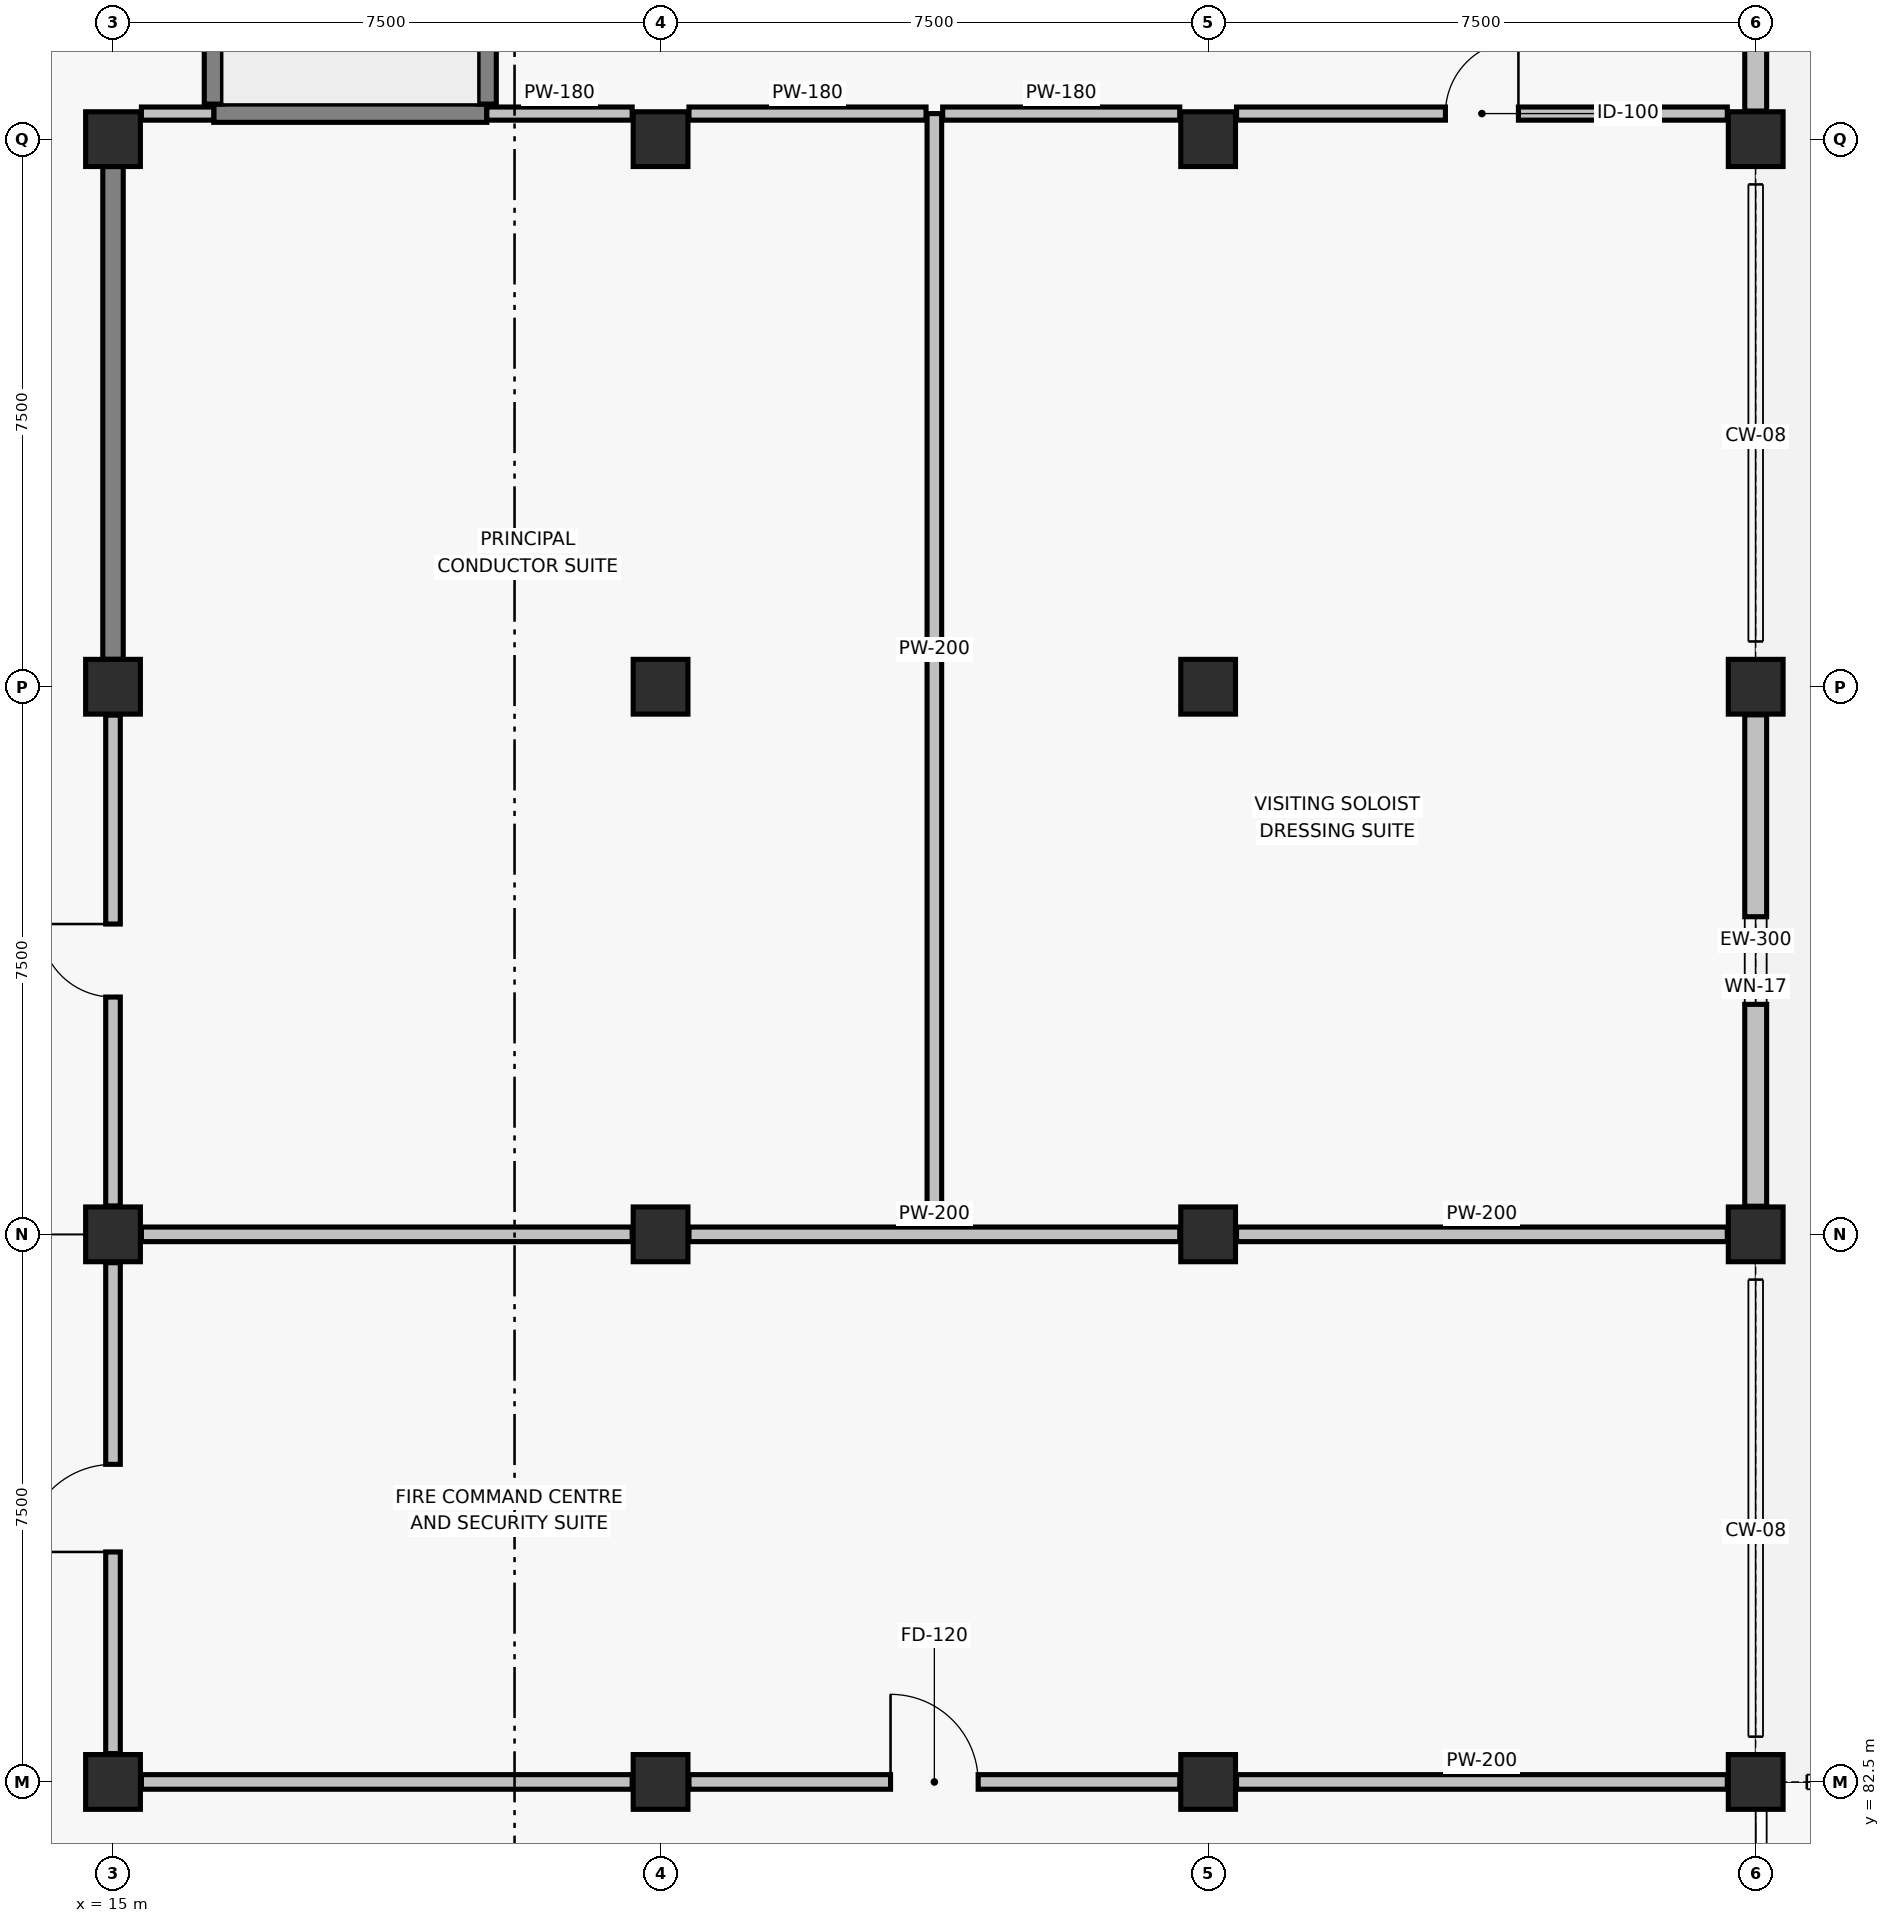
"""IFC4 building model, lengths in metres.
Left out: names, types, materials, properties, quantities, classifications, styles, units other than length and angle.
Written with IfcOpenShell. Run it as: python <this file> out.ifc"""

import sys

from ifc_helpers import new_model, si_unit, direction, frame, frame_2d, origin, origin_2d, place, context, subcontext, project, spatial, rectangle, extrude, element, fill, save


model = new_model("IFC4")
c1 = context("Model", 3, precision=1e-05, world=origin(), true_north=direction((0.0, 1.0)))
c2 = subcontext(c1, "Body", "Model", "MODEL_VIEW")
j1 = project(units=[si_unit("LENGTHUNIT", "METRE"), si_unit("PLANEANGLEUNIT", "RADIAN")], contexts=[c1])
p1 = place(None, origin())
s1 = spatial("IfcSite", under=j1, at=p1, CompositionType="ELEMENT")
p2 = place(p1, origin())
s2 = spatial("IfcBuilding", under=s1, at=p2, CompositionType="ELEMENT")
p3 = place(p2, origin())
s3 = spatial("IfcBuildingStorey", under=s2, at=p3, CompositionType="ELEMENT", Elevation=0.0)
for number, where, z_axis, x_axis in (
    (1, (15.0, 82.5, 0.0), (0.0, 0.0, 1.0), (1.0, 0.0, 0.0)),
    (2, (15.0, 90.0, 0.0), (0.0, 0.0, 1.0), (1.0, 0.0, 0.0)),
    (3, (15.0, 97.5, 0.0), (0.0, 0.0, 1.0), (1.0, 0.0, 0.0)),
    (4, (15.0, 105.0, 0.0), (0.0, 0.0, 1.0), (1.0, 0.0, 0.0)),
    (5, (22.5, 82.5, 0.0), (0.0, 0.0, 1.0), (1.0, 0.0, 0.0)),
    (6, (22.5, 90.0, 0.0), (0.0, 0.0, 1.0), (1.0, 0.0, 0.0)),
    (7, (22.5, 97.5, 0.0), (0.0, 0.0, 1.0), (1.0, 0.0, 0.0)),
    (8, (22.5, 105.0, 0.0), (0.0, 0.0, 1.0), (1.0, 0.0, 0.0)),
    (9, (30.0, 82.5, 0.0), (0.0, 0.0, 1.0), (1.0, 0.0, 0.0)),
    (10, (30.0, 90.0, 0.0), (0.0, 0.0, 1.0), (1.0, 0.0, 0.0)),
    (11, (30.0, 97.5, 0.0), (0.0, 0.0, 1.0), (1.0, 0.0, 0.0)),
    (12, (30.0, 105.0, 0.0), (0.0, 0.0, 1.0), (1.0, 0.0, 0.0)),
    (13, (37.5, 82.5, 0.0), (0.0, 0.0, 1.0), (1.0, 0.0, 0.0)),
    (14, (37.5, 90.0, 0.0), (0.0, 0.0, 1.0), (1.0, 0.0, 0.0)),
    (15, (37.5, 97.5, 0.0), (0.0, 0.0, 1.0), (1.0, 0.0, 0.0)),
    (16, (37.5, 105.0, 0.0), (0.0, 0.0, 1.0), (1.0, 0.0, 0.0)),
):
    element("IfcColumn", number, at=place(p3, frame(where, z_axis=z_axis, x_axis=x_axis)), inside=s3, PredefinedType="COLUMN", context=c2, shape_type="SweptSolid", body=[
        extrude(rectangle(XDim=0.75, YDim=0.75, at=origin_2d()), origin(), (0.0, 0.0, 1.0), 4.8),
    ])
p4 = place(p3, frame((15.0, 97.875, 0.0), z_axis=(0.0, 0.0, 1.0), x_axis=(0.0, 1.0, 0.0)))
e17 = element("IfcWall", 17, at=p4, inside=s3, PredefinedType="SHEAR", context=c2, shape_type="SweptSolid", body=[
    extrude(rectangle(XDim=6.75, YDim=0.28, at=frame_2d((3.375, 0.0))), origin(), (0.0, 0.0, 1.0), 4.5),
])
p5 = place(p3, frame((37.5, 90.385, 0.0), z_axis=(0.0, 0.0, 1.0), x_axis=(0.0, 1.0, 0.0)))
e18 = element("IfcWall", 18, at=p5, inside=s3, PredefinedType="SOLIDWALL", context=c2, shape_type="SweptSolid", body=[
    extrude(rectangle(XDim=6.73, YDim=0.3, at=frame_2d((3.365, 0.0))), origin(), (0.0, 0.0, 1.0), 3.52),
])
p6 = place(p5, frame((2.765, 0.0, 0.6)))
e19 = element("IfcOpeningElement", 19, at=p6, cuts=e18, PredefinedType="OPENING", context=c2, shape_type="SweptSolid", body=[
    extrude(rectangle(XDim=1.2, YDim=1.2, at=frame_2d((0.6, 0.6))), frame((0.0, 0.16, 0.0), z_axis=(0.0, -1.0, 0.0), x_axis=(1.0, 0.0, 0.0)), (0.0, 0.0, 1.0), 0.32),
])
p7 = place(p3, frame((37.5, 105.385, 0.0), z_axis=(0.0, 0.0, 1.0), x_axis=(0.0, 1.0, 0.0)))
e20 = element("IfcWall", 20, at=p7, inside=s3, PredefinedType="SOLIDWALL", context=c2, shape_type="SweptSolid", body=[
    extrude(rectangle(XDim=6.73, YDim=0.3, at=frame_2d((3.365, 0.0))), origin(), (0.0, 0.0, 1.0), 3.67),
])
p8 = place(p7, frame((2.465, 0.0, 0.6)))
e21 = element("IfcOpeningElement", 21, at=p8, cuts=e20, PredefinedType="OPENING", context=c2, shape_type="SweptSolid", body=[
    extrude(rectangle(XDim=1.8, YDim=1.2, at=frame_2d((0.9, 0.6))), frame((0.0, 0.16, 0.0), z_axis=(0.0, -1.0, 0.0), x_axis=(1.0, 0.0, 0.0)), (0.0, 0.0, 1.0), 0.32),
])
p9 = place(p3, frame((16.38, 105.355, 0.0), z_axis=(0.0, 0.0, 1.0), x_axis=(1.0, 0.0, 0.0)))
e22 = element("IfcWall", 22, at=p9, inside=s3, PredefinedType="SOLIDWALL", context=c2, shape_type="SweptSolid", body=[
    extrude(rectangle(XDim=3.74, YDim=0.25, at=frame_2d((1.87, 0.0))), origin(), (0.0, 0.0, 1.0), 4.5),
])
p10 = place(p3, frame((16.375, 105.48, 0.0), z_axis=(0.0, 0.0, 1.0), x_axis=(0.0, 1.0, 0.0)))
e23 = element("IfcWall", 23, at=p10, inside=s3, PredefinedType="SOLIDWALL", context=c2, shape_type="SweptSolid", body=[
    extrude(rectangle(XDim=7.02, YDim=0.25, at=frame_2d((3.51, 0.0))), origin(), (0.0, 0.0, 1.0), 4.5),
])
p11 = place(p10, frame((5.47, 0.0, 0.0)))
e24 = element("IfcOpeningElement", 24, at=p11, cuts=e23, PredefinedType="OPENING", context=c2, shape_type="SweptSolid", body=[
    extrude(rectangle(XDim=1.1, YDim=2.15, at=frame_2d((0.55, 1.075))), frame((0.0, 0.135, 0.0), z_axis=(0.0, -1.0, 0.0), x_axis=(1.0, 0.0, 0.0)), (0.0, 0.0, 1.0), 0.27),
])
p12 = place(p3, frame((20.125, 105.48, 0.0), z_axis=(0.0, 0.0, 1.0), x_axis=(0.0, 1.0, 0.0)))
e25 = element("IfcWall", 25, at=p12, inside=s3, PredefinedType="SOLIDWALL", context=c2, shape_type="SweptSolid", body=[
    extrude(rectangle(XDim=7.02, YDim=0.25, at=frame_2d((3.51, 0.0))), origin(), (0.0, 0.0, 1.0), 4.5),
])
p13 = place(p3, frame((15.389, 105.35, 0.0), z_axis=(0.0, 0.0, 1.0), x_axis=(1.0, 0.0, 0.0)))
e26 = element("IfcWall", 26, at=p13, inside=s3, PredefinedType="PARTITIONING", context=c2, shape_type="SweptSolid", body=[
    extrude(rectangle(XDim=0.991, YDim=0.18, at=frame_2d((0.496, 0.0))), origin(), (0.0, 0.0, 1.0), 2.97),
])
p14 = place(p3, frame((15.389, 82.5, 0.0), z_axis=(0.0, 0.0, 1.0), x_axis=(1.0, 0.0, 0.0)))
e27 = element("IfcWall", 27, at=p14, inside=s3, PredefinedType="PARTITIONING", context=c2, shape_type="SweptSolid", body=[
    extrude(rectangle(XDim=6.722, YDim=0.2, at=frame_2d((3.361, 0.0))), origin(), (0.0, 0.0, 1.0), 2.97),
])
p15 = place(p3, frame((22.889, 82.5, 0.0), z_axis=(0.0, 0.0, 1.0), x_axis=(1.0, 0.0, 0.0)))
e28 = element("IfcWall", 28, at=p15, inside=s3, PredefinedType="PARTITIONING", context=c2, shape_type="SweptSolid", body=[
    extrude(rectangle(XDim=6.722, YDim=0.2, at=frame_2d((3.361, 0.0))), origin(), (0.0, 0.0, 1.0), 3.42),
])
p16 = place(p15, frame((2.761, 0.0, 0.0)))
e29 = element("IfcOpeningElement", 29, at=p16, cuts=e28, PredefinedType="OPENING", context=c2, shape_type="SweptSolid", body=[
    extrude(rectangle(XDim=1.2, YDim=2.15, at=frame_2d((0.6, 1.075))), frame((0.0, 0.11, 0.0), z_axis=(0.0, -1.0, 0.0), x_axis=(1.0, 0.0, 0.0)), (0.0, 0.0, 1.0), 0.22),
])
p17 = place(p3, frame((30.389, 82.5, 0.0), z_axis=(0.0, 0.0, 1.0), x_axis=(1.0, 0.0, 0.0)))
e30 = element("IfcWall", 30, at=p17, inside=s3, PredefinedType="PARTITIONING", context=c2, shape_type="SweptSolid", body=[
    extrude(rectangle(XDim=6.722, YDim=0.2, at=frame_2d((3.361, 0.0))), origin(), (0.0, 0.0, 1.0), 3.42),
])
p18 = place(p3, frame((15.389, 90.0, 0.0), z_axis=(0.0, 0.0, 1.0), x_axis=(1.0, 0.0, 0.0)))
e31 = element("IfcWall", 31, at=p18, inside=s3, PredefinedType="PARTITIONING", context=c2, shape_type="SweptSolid", body=[
    extrude(rectangle(XDim=6.722, YDim=0.2, at=frame_2d((3.361, 0.0))), origin(), (0.0, 0.0, 1.0), 2.97),
])
for number, where, z_axis, x_axis in (
    (32, (22.889, 90.0, 0.0), (0.0, 0.0, 1.0), (1.0, 0.0, 0.0)),
    (33, (30.389, 90.0, 0.0), (0.0, 0.0, 1.0), (1.0, 0.0, 0.0)),
):
    element("IfcWall", number, at=place(p3, frame(where, z_axis=z_axis, x_axis=x_axis)), inside=s3, PredefinedType="PARTITIONING", context=c2, shape_type="SweptSolid", body=[
        extrude(rectangle(XDim=6.722, YDim=0.2, at=frame_2d((3.361, 0.0))), origin(), (0.0, 0.0, 1.0), 3.42),
    ])
p19 = place(p3, frame((26.25, 90.114, 0.0), z_axis=(0.0, 0.0, 1.0), x_axis=(0.0, 1.0, 0.0)))
e34 = element("IfcWall", 34, at=p19, inside=s3, PredefinedType="PARTITIONING", context=c2, shape_type="SweptSolid", body=[
    extrude(rectangle(XDim=15.236, YDim=0.2, at=frame_2d((7.618, 0.0))), origin(), (0.0, 0.0, 1.0), 3.42),
])
p20 = place(p3, frame((20.12, 105.35, 0.0), z_axis=(0.0, 0.0, 1.0), x_axis=(1.0, 0.0, 0.0)))
e35 = element("IfcWall", 35, at=p20, inside=s3, PredefinedType="PARTITIONING", context=c2, shape_type="SweptSolid", body=[
    extrude(rectangle(XDim=1.991, YDim=0.18, at=frame_2d((0.996, 0.0))), origin(), (0.0, 0.0, 1.0), 3.42),
])
p21 = place(p3, frame((22.889, 105.35, 0.0), z_axis=(0.0, 0.0, 1.0), x_axis=(1.0, 0.0, 0.0)))
e36 = element("IfcWall", 36, at=p21, inside=s3, PredefinedType="PARTITIONING", context=c2, shape_type="SweptSolid", body=[
    extrude(rectangle(XDim=3.247, YDim=0.18, at=frame_2d((1.624, 0.0))), origin(), (0.0, 0.0, 1.0), 3.42),
])
p22 = place(p3, frame((26.364, 105.35, 0.0), z_axis=(0.0, 0.0, 1.0), x_axis=(1.0, 0.0, 0.0)))
e37 = element("IfcWall", 37, at=p22, inside=s3, PredefinedType="PARTITIONING", context=c2, shape_type="SweptSolid", body=[
    extrude(rectangle(XDim=3.247, YDim=0.18, at=frame_2d((1.624, 0.0))), origin(), (0.0, 0.0, 1.0), 3.62),
])
p23 = place(p3, frame((30.389, 105.35, 0.0), z_axis=(0.0, 0.0, 1.0), x_axis=(1.0, 0.0, 0.0)))
e38 = element("IfcWall", 38, at=p23, inside=s3, PredefinedType="PARTITIONING", context=c2, shape_type="SweptSolid", body=[
    extrude(rectangle(XDim=6.722, YDim=0.18, at=frame_2d((3.361, 0.0))), origin(), (0.0, 0.0, 1.0), 3.62),
])
p24 = place(p23, frame((2.861, 0.0, 0.0)))
e39 = element("IfcOpeningElement", 39, at=p24, cuts=e38, PredefinedType="OPENING", context=c2, shape_type="SweptSolid", body=[
    extrude(rectangle(XDim=1.0, YDim=2.12, at=frame_2d((0.5, 1.06))), frame((0.0, 0.1, 0.0), z_axis=(0.0, -1.0, 0.0), x_axis=(1.0, 0.0, 0.0)), (0.0, 0.0, 1.0), 0.2),
])
p25 = place(p3, frame((15.0, 82.889, 0.0), z_axis=(0.0, 0.0, 1.0), x_axis=(0.0, 1.0, 0.0)))
e40 = element("IfcWall", 40, at=p25, inside=s3, PredefinedType="PARTITIONING", context=c2, shape_type="SweptSolid", body=[
    extrude(rectangle(XDim=6.722, YDim=0.2, at=frame_2d((3.361, 0.0))), origin(), (0.0, 0.0, 1.0), 2.97),
])
p26 = place(p25, frame((2.761, 0.0, 0.0)))
e41 = element("IfcOpeningElement", 41, at=p26, cuts=e40, PredefinedType="OPENING", context=c2, shape_type="SweptSolid", body=[
    extrude(rectangle(XDim=1.2, YDim=2.15, at=frame_2d((0.6, 1.075))), frame((0.0, 0.11, 0.0), z_axis=(0.0, -1.0, 0.0), x_axis=(1.0, 0.0, 0.0)), (0.0, 0.0, 1.0), 0.22),
])
p27 = place(p3, frame((15.0, 90.389, 0.0), z_axis=(0.0, 0.0, 1.0), x_axis=(0.0, 1.0, 0.0)))
e42 = element("IfcWall", 42, at=p27, inside=s3, PredefinedType="PARTITIONING", context=c2, shape_type="SweptSolid", body=[
    extrude(rectangle(XDim=6.722, YDim=0.2, at=frame_2d((3.361, 0.0))), origin(), (0.0, 0.0, 1.0), 2.97),
])
p28 = place(p27, frame((2.861, 0.0, 0.0)))
e43 = element("IfcOpeningElement", 43, at=p28, cuts=e42, PredefinedType="OPENING", context=c2, shape_type="SweptSolid", body=[
    extrude(rectangle(XDim=1.0, YDim=2.12, at=frame_2d((0.5, 1.06))), frame((0.0, 0.11, 0.0), z_axis=(0.0, -1.0, 0.0), x_axis=(1.0, 0.0, 0.0)), (0.0, 0.0, 1.0), 0.22),
])
p29 = place(p6, origin())
e44 = element("IfcWindow", 44, at=p29, inside=s3, PartitioningType="SINGLE_PANEL", PredefinedType="WINDOW", context=c2, shape_type="SweptSolid", body=[
    extrude(rectangle(XDim=1.2, YDim=1.2, at=frame_2d((0.6, 0.6))), frame((0.0, 0.03, 0.0), z_axis=(0.0, -1.0, 0.0), x_axis=(1.0, 0.0, 0.0)), (0.0, 0.0, 1.0), 0.06),
])
fill(e19, e44)
p30 = place(p16, origin())
e45 = element("IfcDoor", 45, at=p30, inside=s3, OperationType="SINGLE_SWING_LEFT", PredefinedType="DOOR", context=c2, shape_type="SweptSolid", body=[
    extrude(rectangle(XDim=1.2, YDim=2.15, at=frame_2d((0.6, 1.075))), frame((0.0, 0.025, 0.0), z_axis=(0.0, -1.0, 0.0), x_axis=(1.0, 0.0, 0.0)), (0.0, 0.0, 1.0), 0.05),
])
fill(e29, e45)
p31 = place(p24, origin())
e46 = element("IfcDoor", 46, at=p31, inside=s3, OperationType="SINGLE_SWING_RIGHT", PredefinedType="DOOR", context=c2, shape_type="SweptSolid", body=[
    extrude(rectangle(XDim=1.0, YDim=2.12, at=frame_2d((0.5, 1.06))), frame((0.0, 0.025, 0.0), z_axis=(0.0, -1.0, 0.0), x_axis=(1.0, 0.0, 0.0)), (0.0, 0.0, 1.0), 0.05),
])
fill(e39, e46)
p32 = place(p26, origin())
e47 = element("IfcDoor", 47, at=p32, inside=s3, OperationType="SINGLE_SWING_LEFT", PredefinedType="DOOR", context=c2, shape_type="SweptSolid", body=[
    extrude(rectangle(XDim=1.2, YDim=2.15, at=frame_2d((0.6, 1.075))), frame((0.0, 0.025, 0.0), z_axis=(0.0, -1.0, 0.0), x_axis=(1.0, 0.0, 0.0)), (0.0, 0.0, 1.0), 0.05),
])
fill(e41, e47)
p33 = place(p28, origin())
e48 = element("IfcDoor", 48, at=p33, inside=s3, OperationType="SINGLE_SWING_RIGHT", PredefinedType="DOOR", context=c2, shape_type="SweptSolid", body=[
    extrude(rectangle(XDim=1.0, YDim=2.12, at=frame_2d((0.5, 1.06))), frame((0.0, 0.025, 0.0), z_axis=(0.0, -1.0, 0.0), x_axis=(1.0, 0.0, 0.0)), (0.0, 0.0, 1.0), 0.05),
])
fill(e43, e48)
save(model, sys.argv[1])
